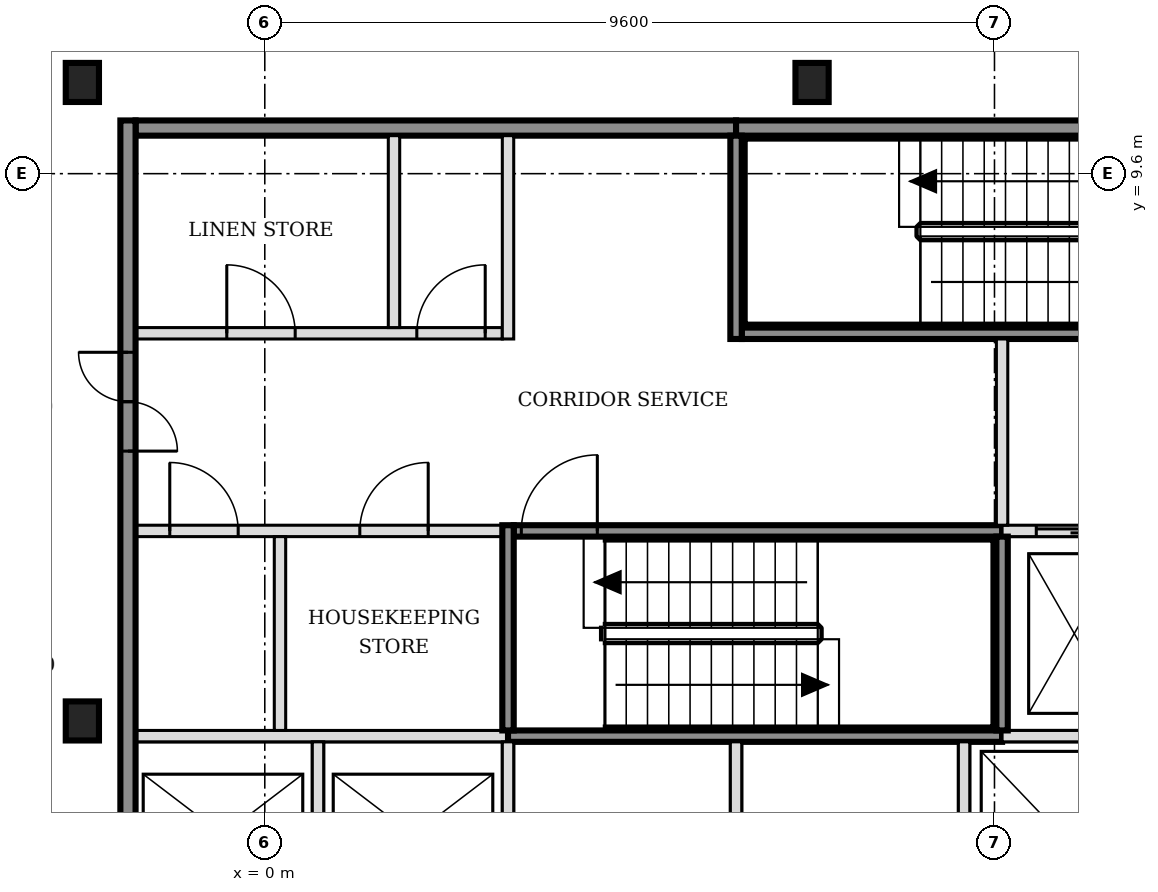
"""IFC4 building model, lengths in metres.
Left out: names, types, materials, properties, quantities, classifications, styles, units other than length and angle.
Written with IfcOpenShell. Run it as: python <this file> out.ifc"""

import sys

from ifc_helpers import new_model, si_unit, direction, frame, frame_2d, origin, origin_2d, place, context, subcontext, project, spatial, rectangle, i_section, extrude, element, fill, save


model = new_model("IFC4")
c1 = context("Model", 3, precision=1e-05, world=origin(), true_north=direction((0.0, 1.0)))
c2 = subcontext(c1, "Body", "Model", "MODEL_VIEW")
j1 = project(units=[si_unit("LENGTHUNIT", "METRE"), si_unit("PLANEANGLEUNIT", "RADIAN")], contexts=[c1])
p1 = place(None, origin())
s1 = spatial("IfcSite", under=j1, at=p1, CompositionType="ELEMENT")
p2 = place(p1, origin())
s2 = spatial("IfcBuilding", under=s1, at=p2, CompositionType="ELEMENT")
p3 = place(p2, frame((0.0, 0.0, 97.8)))
s3 = spatial("IfcBuildingStorey", under=s2, at=p3, CompositionType="ELEMENT", Elevation=97.8)
for number, where, z_axis, x_axis in (
    (1, (-2.4, 2.4, -0.15), (0.0, 0.0, 1.0), (1.0, 0.0, 0.0)),
    (2, (-2.4, 10.8, -0.15), (0.0, 0.0, 1.0), (1.0, 0.0, 0.0)),
    (3, (7.2, 10.8, -0.15), (0.0, 0.0, 1.0), (1.0, 0.0, 0.0)),
):
    element("IfcColumn", number, at=place(p3, frame(where, z_axis=z_axis, x_axis=x_axis)), inside=s3, PredefinedType="COLUMN", context=c2, shape_type="SweptSolid", body=[
        extrude(i_section(OverallWidth=0.437, OverallDepth=0.514, WebThickness=0.061, FlangeThickness=0.097, FilletRadius=0.015, at=origin_2d()), origin(), (0.0, 0.0, 1.0), 3.6),
    ])
p4 = place(p3, frame((-1.7, 2.2, 0.0), z_axis=(0.0, 0.0, 1.0), x_axis=(1.0, 0.0, 0.0)))
e4 = element("IfcWall", 4, at=p4, inside=s3, PredefinedType="SOLIDWALL", context=c2, shape_type="SweptSolid", body=[
    extrude(rectangle(XDim=4.9, YDim=0.15, at=frame_2d((2.45, 0.0))), origin(), (0.0, 0.0, 1.0), 3.45),
])
p5 = place(p3, frame((3.2, 2.2, 0.0), z_axis=(0.0, 0.0, 1.0), x_axis=(1.0, 0.0, 0.0)))
e5 = element("IfcWall", 5, at=p5, inside=s3, PredefinedType="SOLIDWALL", context=c2, shape_type="SweptSolid", body=[
    extrude(rectangle(XDim=6.5, YDim=0.15, at=frame_2d((3.25, 0.0))), origin(), (0.0, 0.0, 1.0), 3.45),
])
p6 = place(p3, frame((9.7, 2.2, 0.0), z_axis=(0.0, 0.0, 1.0), x_axis=(1.0, 0.0, 0.0)))
e6 = element("IfcWall", 6, at=p6, inside=s3, PredefinedType="SOLIDWALL", context=c2, shape_type="SweptSolid", body=[
    extrude(rectangle(XDim=4.525, YDim=0.15, at=frame_2d((2.263, 0.0))), origin(), (0.0, 0.0, 1.0), 3.45),
])
p7 = place(p3, frame((-1.7, 4.9, 0.0), z_axis=(0.0, 0.0, 1.0), x_axis=(1.0, 0.0, 0.0)))
e7 = element("IfcWall", 7, at=p7, inside=s3, PredefinedType="PARTITIONING", context=c2, shape_type="SweptSolid", body=[
    extrude(rectangle(XDim=4.825, YDim=0.15, at=frame_2d((2.413, 0.0))), origin(), (0.0, 0.0, 1.0), 3.45),
])
p8 = place(p7, frame((0.45, 0.0, 0.0)))
e8 = element("IfcOpeningElement", 8, at=p8, cuts=e7, PredefinedType="OPENING", context=c2, shape_type="SweptSolid", body=[
    extrude(rectangle(XDim=0.9, YDim=2.1, at=frame_2d((0.45, 1.05))), frame((0.0, 0.085, 0.0), z_axis=(0.0, -1.0, 0.0), x_axis=(1.0, 0.0, 0.0)), (0.0, 0.0, 1.0), 0.17),
])
p9 = place(p7, frame((2.95, 0.0, 0.0)))
e9 = element("IfcOpeningElement", 9, at=p9, cuts=e7, PredefinedType="OPENING", context=c2, shape_type="SweptSolid", body=[
    extrude(rectangle(XDim=0.9, YDim=2.1, at=frame_2d((0.45, 1.05))), frame((0.0, 0.085, 0.0), z_axis=(0.0, -1.0, 0.0), x_axis=(1.0, 0.0, 0.0)), (0.0, 0.0, 1.0), 0.17),
])
p10 = place(p3, frame((3.275, 4.9, 0.0), z_axis=(0.0, 0.0, 1.0), x_axis=(1.0, 0.0, 0.0)))
e10 = element("IfcWall", 10, at=p10, inside=s3, PredefinedType="SOLIDWALL", context=c2, shape_type="SweptSolid", body=[
    extrude(rectangle(XDim=6.425, YDim=0.15, at=frame_2d((3.212, 0.0))), origin(), (0.0, 0.0, 1.0), 3.45),
])
p11 = place(p10, frame((0.1, 0.0, 0.0)))
e11 = element("IfcOpeningElement", 11, at=p11, cuts=e10, PredefinedType="OPENING", context=c2, shape_type="SweptSolid", body=[
    extrude(rectangle(XDim=1.0, YDim=2.1, at=frame_2d((0.5, 1.05))), frame((0.0, 0.085, 0.0), z_axis=(0.0, -1.0, 0.0), x_axis=(1.0, 0.0, 0.0)), (0.0, 0.0, 1.0), 0.17),
])
p12 = place(p3, frame((9.7, 4.9, 0.0), z_axis=(0.0, 0.0, 1.0), x_axis=(1.0, 0.0, 0.0)))
e12 = element("IfcWall", 12, at=p12, inside=s3, PredefinedType="SOLIDWALL", context=c2, shape_type="SweptSolid", body=[
    extrude(rectangle(XDim=6.4, YDim=0.15, at=frame_2d((3.2, 0.0))), origin(), (0.0, 0.0, 1.0), 3.45),
])
p13 = place(p12, frame((0.45, 0.0, 0.0)))
e13 = element("IfcOpeningElement", 13, at=p13, cuts=e12, PredefinedType="OPENING", context=c2, shape_type="SweptSolid", body=[
    extrude(rectangle(XDim=1.0, YDim=2.1, at=frame_2d((0.5, 1.05))), frame((0.0, 0.085, 0.0), z_axis=(0.0, -1.0, 0.0), x_axis=(1.0, 0.0, 0.0)), (0.0, 0.0, 1.0), 0.17),
])
p14 = place(p12, frame((2.35, 0.0, 0.0)))
e14 = element("IfcOpeningElement", 14, at=p14, cuts=e12, PredefinedType="OPENING", context=c2, shape_type="SweptSolid", body=[
    extrude(rectangle(XDim=1.0, YDim=2.1, at=frame_2d((0.5, 1.05))), frame((0.0, 0.085, 0.0), z_axis=(0.0, -1.0, 0.0), x_axis=(1.0, 0.0, 0.0)), (0.0, 0.0, 1.0), 0.17),
])
p15 = place(p12, frame((4.7, 0.0, 0.0)))
e15 = element("IfcOpeningElement", 15, at=p15, cuts=e12, PredefinedType="OPENING", context=c2, shape_type="SweptSolid", body=[
    extrude(rectangle(XDim=0.9, YDim=2.1, at=frame_2d((0.45, 1.05))), frame((0.0, 0.085, 0.0), z_axis=(0.0, -1.0, 0.0), x_axis=(1.0, 0.0, 0.0)), (0.0, 0.0, 1.0), 0.17),
])
p16 = place(p3, frame((-1.7, 7.5, 0.0), z_axis=(0.0, 0.0, 1.0), x_axis=(1.0, 0.0, 0.0)))
e16 = element("IfcWall", 16, at=p16, inside=s3, PredefinedType="PARTITIONING", context=c2, shape_type="SweptSolid", body=[
    extrude(rectangle(XDim=4.825, YDim=0.15, at=frame_2d((2.413, 0.0))), origin(), (0.0, 0.0, 1.0), 3.45),
])
p17 = place(p16, frame((1.2, 0.0, 0.0)))
e17 = element("IfcOpeningElement", 17, at=p17, cuts=e16, PredefinedType="OPENING", context=c2, shape_type="SweptSolid", body=[
    extrude(rectangle(XDim=0.9, YDim=2.1, at=frame_2d((0.45, 1.05))), frame((0.0, 0.085, 0.0), z_axis=(0.0, -1.0, 0.0), x_axis=(1.0, 0.0, 0.0)), (0.0, 0.0, 1.0), 0.17),
])
p18 = place(p16, frame((3.7, 0.0, 0.0)))
e18 = element("IfcOpeningElement", 18, at=p18, cuts=e16, PredefinedType="OPENING", context=c2, shape_type="SweptSolid", body=[
    extrude(rectangle(XDim=0.9, YDim=2.1, at=frame_2d((0.45, 1.05))), frame((0.0, 0.085, 0.0), z_axis=(0.0, -1.0, 0.0), x_axis=(1.0, 0.0, 0.0)), (0.0, 0.0, 1.0), 0.17),
])
p19 = place(p3, frame((6.275, 7.5, 0.0), z_axis=(0.0, 0.0, 1.0), x_axis=(1.0, 0.0, 0.0)))
e19 = element("IfcWall", 19, at=p19, inside=s3, PredefinedType="SOLIDWALL", context=c2, shape_type="SweptSolid", body=[
    extrude(rectangle(XDim=6.425, YDim=0.15, at=frame_2d((3.212, 0.0))), origin(), (0.0, 0.0, 1.0), 3.45),
])
p20 = place(p19, frame((5.225, 0.0, 0.0)))
e20 = element("IfcOpeningElement", 20, at=p20, cuts=e19, PredefinedType="OPENING", context=c2, shape_type="SweptSolid", body=[
    extrude(rectangle(XDim=1.0, YDim=2.1, at=frame_2d((0.5, 1.05))), frame((0.0, 0.085, 0.0), z_axis=(0.0, -1.0, 0.0), x_axis=(1.0, 0.0, 0.0)), (0.0, 0.0, 1.0), 0.17),
])
p21 = place(p3, frame((-1.7, 10.2, 0.0), z_axis=(0.0, 0.0, 1.0), x_axis=(1.0, 0.0, 0.0)))
e21 = element("IfcWall", 21, at=p21, inside=s3, PredefinedType="SOLIDWALL", context=c2, shape_type="SweptSolid", body=[
    extrude(rectangle(XDim=7.9, YDim=0.2, at=frame_2d((3.95, 0.0))), origin(), (0.0, 0.0, 1.0), 3.45),
])
p22 = place(p3, frame((6.2, 10.2, 0.0), z_axis=(0.0, 0.0, 1.0), x_axis=(1.0, 0.0, 0.0)))
e22 = element("IfcWall", 22, at=p22, inside=s3, PredefinedType="SOLIDWALL", context=c2, shape_type="SweptSolid", body=[
    extrude(rectangle(XDim=6.5, YDim=0.2, at=frame_2d((3.25, 0.0))), origin(), (0.0, 0.0, 1.0), 3.45),
])
p23 = place(p3, frame((-1.8, -5.5, 0.0), z_axis=(0.0, 0.0, 1.0), x_axis=(0.0, 1.0, 0.0)))
e23 = element("IfcWall", 23, at=p23, inside=s3, PredefinedType="SOLIDWALL", context=c2, shape_type="SweptSolid", body=[
    extrude(rectangle(XDim=15.8, YDim=0.2, at=frame_2d((7.9, 0.0))), origin(), (0.0, 0.0, 1.0), 3.45),
])
p24 = place(p23, frame((3.05, 0.0, 0.0)))
e24 = element("IfcOpeningElement", 24, at=p24, cuts=e23, PredefinedType="OPENING", context=c2, shape_type="SweptSolid", body=[
    extrude(rectangle(XDim=1.3, YDim=2.1, at=frame_2d((0.65, 1.05))), frame((0.0, 0.11, 0.0), z_axis=(0.0, -1.0, 0.0), x_axis=(1.0, 0.0, 0.0)), (0.0, 0.0, 1.0), 0.22),
])
p25 = place(p23, frame((11.45, 0.0, 0.0)))
e25 = element("IfcOpeningElement", 25, at=p25, cuts=e23, PredefinedType="OPENING", context=c2, shape_type="SweptSolid", body=[
    extrude(rectangle(XDim=1.3, YDim=2.1, at=frame_2d((0.65, 1.05))), frame((0.0, 0.11, 0.0), z_axis=(0.0, -1.0, 0.0), x_axis=(1.0, 0.0, 0.0)), (0.0, 0.0, 1.0), 0.22),
])
p26 = place(p3, frame((0.2, 2.275, 0.0), z_axis=(0.0, 0.0, 1.0), x_axis=(0.0, 1.0, 0.0)))
e26 = element("IfcWall", 26, at=p26, inside=s3, PredefinedType="PARTITIONING", context=c2, shape_type="SweptSolid", body=[
    extrude(rectangle(XDim=2.55, YDim=0.15, at=frame_2d((1.275, 0.0))), origin(), (0.0, 0.0, 1.0), 3.45),
])
p27 = place(p3, frame((0.7, -0.325, 0.0), z_axis=(0.0, 0.0, 1.0), x_axis=(0.0, 1.0, 0.0)))
e27 = element("IfcWall", 27, at=p27, inside=s3, PredefinedType="SOLIDWALL", context=c2, shape_type="SweptSolid", body=[
    extrude(rectangle(XDim=2.45, YDim=0.15, at=frame_2d((1.225, 0.0))), origin(), (0.0, 0.0, 1.0), 3.45),
])
p28 = place(p3, frame((1.7, 7.575, 0.0), z_axis=(0.0, 0.0, 1.0), x_axis=(0.0, 1.0, 0.0)))
e28 = element("IfcWall", 28, at=p28, inside=s3, PredefinedType="PARTITIONING", context=c2, shape_type="SweptSolid", body=[
    extrude(rectangle(XDim=2.525, YDim=0.15, at=frame_2d((1.263, 0.0))), origin(), (0.0, 0.0, 1.0), 3.45),
])
p29 = place(p3, frame((3.2, -0.325, 0.0), z_axis=(0.0, 0.0, 1.0), x_axis=(0.0, 1.0, 0.0)))
e29 = element("IfcWall", 29, at=p29, inside=s3, PredefinedType="SOLIDWALL", context=c2, shape_type="SweptSolid", body=[
    extrude(rectangle(XDim=2.45, YDim=0.15, at=frame_2d((1.225, 0.0))), origin(), (0.0, 0.0, 1.0), 3.45),
])
p30 = place(p3, frame((3.2, 2.275, 0.0), z_axis=(0.0, 0.0, 1.0), x_axis=(0.0, 1.0, 0.0)))
e30 = element("IfcWall", 30, at=p30, inside=s3, PredefinedType="SOLIDWALL", context=c2, shape_type="SweptSolid", body=[
    extrude(rectangle(XDim=2.7, YDim=0.15, at=frame_2d((1.35, 0.0))), origin(), (0.0, 0.0, 1.0), 3.45),
])
p31 = place(p3, frame((3.2, 7.425, 0.0), z_axis=(0.0, 0.0, 1.0), x_axis=(0.0, 1.0, 0.0)))
e31 = element("IfcWall", 31, at=p31, inside=s3, PredefinedType="PARTITIONING", context=c2, shape_type="SweptSolid", body=[
    extrude(rectangle(XDim=2.675, YDim=0.15, at=frame_2d((1.337, 0.0))), origin(), (0.0, 0.0, 1.0), 3.45),
])
p32 = place(p3, frame((6.2, -0.325, 0.0), z_axis=(0.0, 0.0, 1.0), x_axis=(0.0, 1.0, 0.0)))
e32 = element("IfcWall", 32, at=p32, inside=s3, PredefinedType="SOLIDWALL", context=c2, shape_type="SweptSolid", body=[
    extrude(rectangle(XDim=2.45, YDim=0.15, at=frame_2d((1.225, 0.0))), origin(), (0.0, 0.0, 1.0), 3.45),
])
p33 = place(p3, frame((6.2, 7.425, 0.0), z_axis=(0.0, 0.0, 1.0), x_axis=(0.0, 1.0, 0.0)))
e33 = element("IfcWall", 33, at=p33, inside=s3, PredefinedType="SOLIDWALL", context=c2, shape_type="SweptSolid", body=[
    extrude(rectangle(XDim=2.675, YDim=0.15, at=frame_2d((1.337, 0.0))), origin(), (0.0, 0.0, 1.0), 3.45),
])
p34 = place(p3, frame((9.2, -0.325, 0.0), z_axis=(0.0, 0.0, 1.0), x_axis=(0.0, 1.0, 0.0)))
e34 = element("IfcWall", 34, at=p34, inside=s3, PredefinedType="SOLIDWALL", context=c2, shape_type="SweptSolid", body=[
    extrude(rectangle(XDim=2.45, YDim=0.15, at=frame_2d((1.225, 0.0))), origin(), (0.0, 0.0, 1.0), 3.45),
])
p35 = place(p3, frame((9.7, 2.275, 0.0), z_axis=(0.0, 0.0, 1.0), x_axis=(0.0, 1.0, 0.0)))
e35 = element("IfcWall", 35, at=p35, inside=s3, PredefinedType="SOLIDWALL", context=c2, shape_type="SweptSolid", body=[
    extrude(rectangle(XDim=2.55, YDim=0.15, at=frame_2d((1.275, 0.0))), origin(), (0.0, 0.0, 1.0), 3.45),
])
p36 = place(p3, frame((9.7, 4.975, 0.0), z_axis=(0.0, 0.0, 1.0), x_axis=(0.0, 1.0, 0.0)))
e36 = element("IfcWall", 36, at=p36, inside=s3, PredefinedType="SOLIDWALL", context=c2, shape_type="SweptSolid", body=[
    extrude(rectangle(XDim=2.45, YDim=0.15, at=frame_2d((1.225, 0.0))), origin(), (0.0, 0.0, 1.0), 3.45),
])
p37 = place(p13, origin())
e37 = element("IfcDoor", 37, at=p37, inside=s3, OperationType="DOUBLE_DOOR_SLIDING", PredefinedType="DOOR", context=c2, shape_type="SweptSolid", body=[
    extrude(rectangle(XDim=1.0, YDim=2.1, at=frame_2d((0.5, 1.05))), frame((0.0, 0.025, 0.0), z_axis=(0.0, -1.0, 0.0), x_axis=(1.0, 0.0, 0.0)), (0.0, 0.0, 1.0), 0.05),
])
fill(e13, e37)
p38 = place(p11, origin())
e38 = element("IfcDoor", 38, at=p38, inside=s3, OperationType="SINGLE_SWING_RIGHT", PredefinedType="DOOR", context=c2, shape_type="SweptSolid", body=[
    extrude(rectangle(XDim=1.0, YDim=2.1, at=frame_2d((0.5, 1.05))), frame((0.0, 0.025, 0.0), z_axis=(0.0, -1.0, 0.0), x_axis=(1.0, 0.0, 0.0)), (0.0, 0.0, 1.0), 0.05),
])
fill(e11, e38)
p39 = place(p25, origin())
e39 = element("IfcDoor", 39, at=p39, inside=s3, OperationType="DOUBLE_DOOR_SINGLE_SWING", PredefinedType="DOOR", context=c2, shape_type="SweptSolid", body=[
    extrude(rectangle(XDim=1.3, YDim=2.1, at=frame_2d((0.65, 1.05))), frame((0.0, 0.025, 0.0), z_axis=(0.0, -1.0, 0.0), x_axis=(1.0, 0.0, 0.0)), (0.0, 0.0, 1.0), 0.05),
])
fill(e25, e39)
p40 = place(p8, origin())
e40 = element("IfcDoor", 40, at=p40, inside=s3, OperationType="SINGLE_SWING_LEFT", PredefinedType="DOOR", context=c2, shape_type="SweptSolid", body=[
    extrude(rectangle(XDim=0.9, YDim=2.1, at=frame_2d((0.45, 1.05))), frame((0.0, 0.025, 0.0), z_axis=(0.0, -1.0, 0.0), x_axis=(1.0, 0.0, 0.0)), (0.0, 0.0, 1.0), 0.05),
])
fill(e8, e40)
p41 = place(p9, origin())
e41 = element("IfcDoor", 41, at=p41, inside=s3, OperationType="SINGLE_SWING_RIGHT", PredefinedType="DOOR", context=c2, shape_type="SweptSolid", body=[
    extrude(rectangle(XDim=0.9, YDim=2.1, at=frame_2d((0.45, 1.05))), frame((0.0, 0.025, 0.0), z_axis=(0.0, -1.0, 0.0), x_axis=(1.0, 0.0, 0.0)), (0.0, 0.0, 1.0), 0.05),
])
fill(e9, e41)
p42 = place(p17, origin())
e42 = element("IfcDoor", 42, at=p42, inside=s3, OperationType="SINGLE_SWING_LEFT", PredefinedType="DOOR", context=c2, shape_type="SweptSolid", body=[
    extrude(rectangle(XDim=0.9, YDim=2.1, at=frame_2d((0.45, 1.05))), frame((0.0, 0.025, 0.0), z_axis=(0.0, -1.0, 0.0), x_axis=(1.0, 0.0, 0.0)), (0.0, 0.0, 1.0), 0.05),
])
fill(e17, e42)
p43 = place(p18, origin())
e43 = element("IfcDoor", 43, at=p43, inside=s3, OperationType="SINGLE_SWING_RIGHT", PredefinedType="DOOR", context=c2, shape_type="SweptSolid", body=[
    extrude(rectangle(XDim=0.9, YDim=2.1, at=frame_2d((0.45, 1.05))), frame((0.0, 0.025, 0.0), z_axis=(0.0, -1.0, 0.0), x_axis=(1.0, 0.0, 0.0)), (0.0, 0.0, 1.0), 0.05),
])
fill(e18, e43)
save(model, sys.argv[1])
